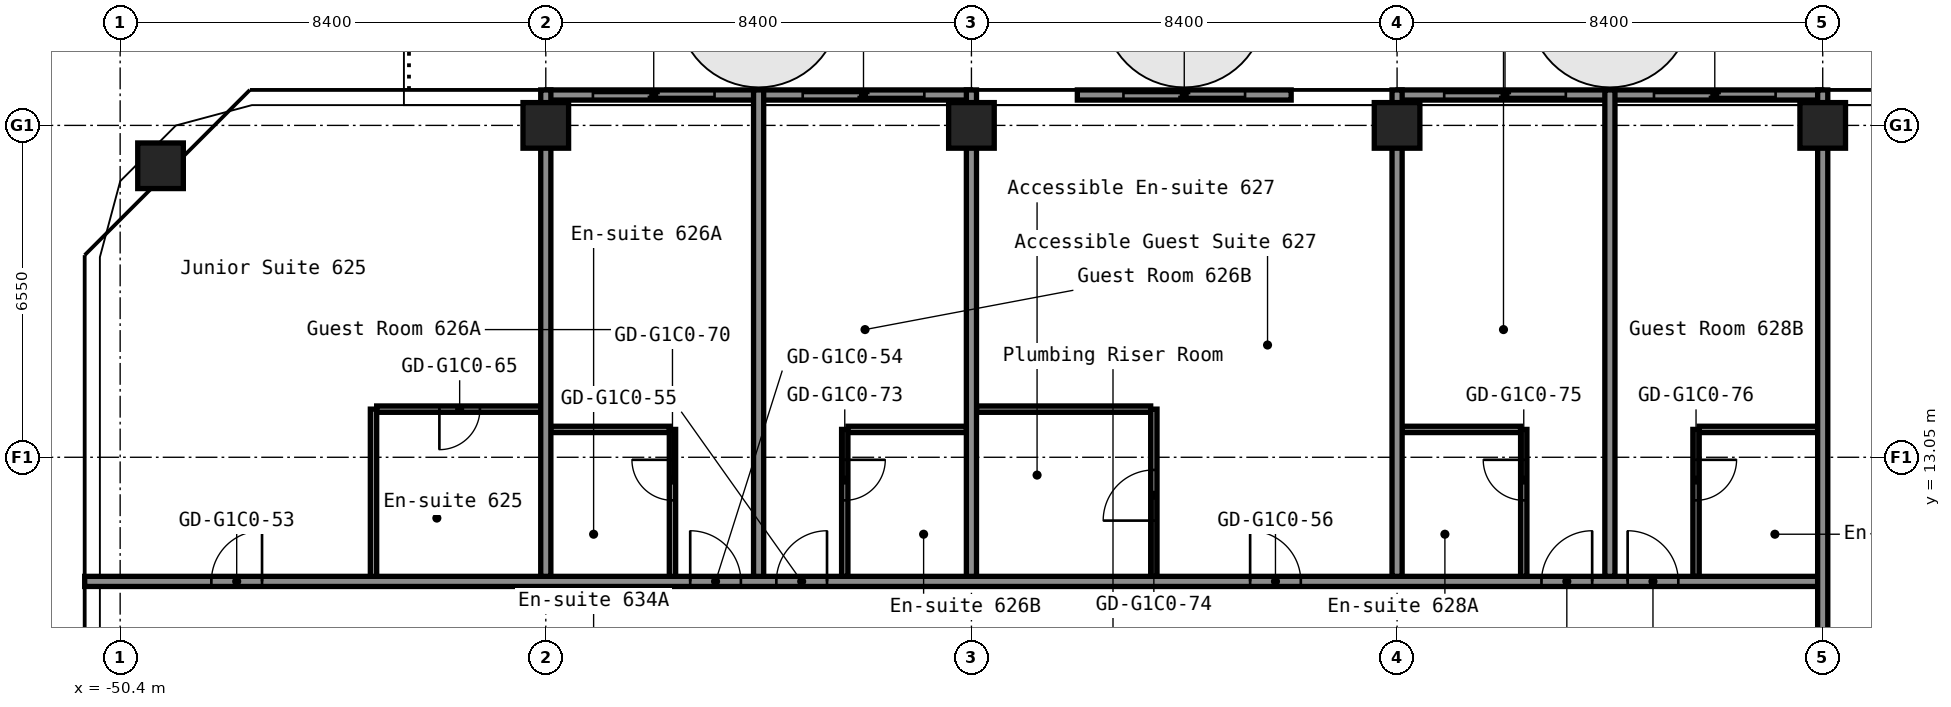
"""IFC4 building model, lengths in metres.
Left out: names, types, materials, properties, quantities, classifications, styles, units other than length and angle.
Written with IfcOpenShell. Run it as: python <this file> out.ifc"""

import sys

from ifc_helpers import new_model, si_unit, direction, frame, frame_2d, origin, origin_2d, place, context, subcontext, project, spatial, rectangle, hollow_rectangle, extrude, element, fill, save


model = new_model("IFC4")
c1 = context("Model", 3, precision=1e-05, world=origin(), true_north=direction((0.0, 1.0)))
c2 = subcontext(c1, "Body", "Model", "MODEL_VIEW")
j1 = project(units=[si_unit("LENGTHUNIT", "METRE"), si_unit("PLANEANGLEUNIT", "RADIAN")], contexts=[c1])
p1 = place(None, origin())
s1 = spatial("IfcSite", under=j1, at=p1, CompositionType="ELEMENT")
p2 = place(p1, origin())
s2 = spatial("IfcBuilding", under=s1, at=p2, CompositionType="ELEMENT")
p3 = place(p2, frame((0.0, 0.0, 26.2)))
s3 = spatial("IfcBuildingStorey", under=s2, at=p3, CompositionType="ELEMENT", Elevation=26.2)
for number, where, z_axis, x_axis in (
    (1, (-49.603, 18.803, 0.0), (0.0, 0.0, 1.0), (1.0, 0.0, 0.0)),
    (2, (-42.0, 19.6, 0.0), (0.0, 0.0, 1.0), (1.0, 0.0, 0.0)),
    (3, (-33.6, 19.6, 0.0), (0.0, 0.0, 1.0), (1.0, 0.0, 0.0)),
    (4, (-25.2, 19.6, 0.0), (0.0, 0.0, 1.0), (1.0, 0.0, 0.0)),
    (5, (-16.8, 19.6, 0.0), (0.0, 0.0, 1.0), (1.0, 0.0, 0.0)),
):
    element("IfcColumn", number, at=place(p3, frame(where, z_axis=z_axis, x_axis=x_axis)), inside=s3, PredefinedType="COLUMN", context=c2, shape_type="SweptSolid", body=[
        extrude(hollow_rectangle(XDim=0.9, YDim=0.9, WallThickness=0.036, at=origin_2d()), origin(), (0.0, 0.0, 1.0), 2.8),
    ])
p4 = place(p3, frame((-51.1, 10.6, 0.0), z_axis=(0.0, 0.0, 1.0), x_axis=(1.0, 0.0, 0.0)))
e6 = element("IfcWall", 6, at=p4, inside=s3, PredefinedType="PARTITIONING", context=c2, shape_type="SweptSolid", body=[
    extrude(rectangle(XDim=34.3, YDim=0.2, at=frame_2d((17.15, 0.0))), origin(), (0.0, 0.0, 1.0), 2.8),
])
p5 = place(p4, frame((2.5, 0.0, 0.0)))
e7 = element("IfcOpeningElement", 7, at=p5, cuts=e6, PredefinedType="OPENING", context=c2, shape_type="SweptSolid", body=[
    extrude(rectangle(XDim=1.0, YDim=2.1, at=frame_2d((0.5, 1.05))), frame((0.0, 0.11, 0.0), z_axis=(0.0, -1.0, 0.0), x_axis=(1.0, 0.0, 0.0)), (0.0, 0.0, 1.0), 0.22),
])
p6 = place(p4, frame((11.95, 0.0, 0.0)))
e8 = element("IfcOpeningElement", 8, at=p6, cuts=e6, PredefinedType="OPENING", context=c2, shape_type="SweptSolid", body=[
    extrude(rectangle(XDim=1.0, YDim=2.1, at=frame_2d((0.5, 1.05))), frame((0.0, 0.11, 0.0), z_axis=(0.0, -1.0, 0.0), x_axis=(1.0, 0.0, 0.0)), (0.0, 0.0, 1.0), 0.22),
])
p7 = place(p4, frame((13.65, 0.0, 0.0)))
e9 = element("IfcOpeningElement", 9, at=p7, cuts=e6, PredefinedType="OPENING", context=c2, shape_type="SweptSolid", body=[
    extrude(rectangle(XDim=1.0, YDim=2.1, at=frame_2d((0.5, 1.05))), frame((0.0, 0.11, 0.0), z_axis=(0.0, -1.0, 0.0), x_axis=(1.0, 0.0, 0.0)), (0.0, 0.0, 1.0), 0.22),
])
p8 = place(p4, frame((23.0, 0.0, 0.0)))
e10 = element("IfcOpeningElement", 10, at=p8, cuts=e6, PredefinedType="OPENING", context=c2, shape_type="SweptSolid", body=[
    extrude(rectangle(XDim=1.0, YDim=2.1, at=frame_2d((0.5, 1.05))), frame((0.0, 0.11, 0.0), z_axis=(0.0, -1.0, 0.0), x_axis=(1.0, 0.0, 0.0)), (0.0, 0.0, 1.0), 0.22),
])
p9 = place(p4, frame((28.75, 0.0, 0.0)))
e11 = element("IfcOpeningElement", 11, at=p9, cuts=e6, PredefinedType="OPENING", context=c2, shape_type="SweptSolid", body=[
    extrude(rectangle(XDim=1.0, YDim=2.1, at=frame_2d((0.5, 1.05))), frame((0.0, 0.11, 0.0), z_axis=(0.0, -1.0, 0.0), x_axis=(1.0, 0.0, 0.0)), (0.0, 0.0, 1.0), 0.22),
])
p10 = place(p4, frame((30.45, 0.0, 0.0)))
e12 = element("IfcOpeningElement", 12, at=p10, cuts=e6, PredefinedType="OPENING", context=c2, shape_type="SweptSolid", body=[
    extrude(rectangle(XDim=1.0, YDim=2.1, at=frame_2d((0.5, 1.05))), frame((0.0, 0.11, 0.0), z_axis=(0.0, -1.0, 0.0), x_axis=(1.0, 0.0, 0.0)), (0.0, 0.0, 1.0), 0.22),
])
p11 = place(p3, frame((-41.9, 13.6, 0.0), z_axis=(0.0, 0.0, 1.0), x_axis=(1.0, 0.0, 0.0)))
e13 = element("IfcWall", 13, at=p11, inside=s3, PredefinedType="PARTITIONING", context=c2, shape_type="SweptSolid", body=[
    extrude(rectangle(XDim=2.337, YDim=0.125, at=frame_2d((1.169, 0.0))), origin(), (0.0, 0.0, 1.0), 2.8),
])
for number, where, z_axis, x_axis in (
    (14, (-36.038, 13.6, 0.0), (0.0, 0.0, 1.0), (1.0, 0.0, 0.0)),
    (15, (-25.1, 13.6, 0.0), (0.0, 0.0, 1.0), (1.0, 0.0, 0.0)),
    (16, (-19.238, 13.6, 0.0), (0.0, 0.0, 1.0), (1.0, 0.0, 0.0)),
):
    element("IfcWall", number, at=place(p3, frame(where, z_axis=z_axis, x_axis=x_axis)), inside=s3, PredefinedType="PARTITIONING", context=c2, shape_type="SweptSolid", body=[
        extrude(rectangle(XDim=2.338, YDim=0.125, at=frame_2d((1.169, 0.0))), origin(), (0.0, 0.0, 1.0), 2.8),
    ])
p12 = place(p3, frame((-45.337, 14.0, 0.0), z_axis=(0.0, 0.0, 1.0), x_axis=(1.0, 0.0, 0.0)))
e17 = element("IfcWall", 17, at=p12, inside=s3, PredefinedType="PARTITIONING", context=c2, shape_type="SweptSolid", body=[
    extrude(rectangle(XDim=3.237, YDim=0.125, at=frame_2d((1.619, 0.0))), origin(), (0.0, 0.0, 1.0), 2.8),
])
p13 = place(p12, frame((1.238, 0.0, 0.0)))
e18 = element("IfcOpeningElement", 18, at=p13, cuts=e17, PredefinedType="OPENING", context=c2, shape_type="SweptSolid", body=[
    extrude(rectangle(XDim=0.8, YDim=2.1, at=frame_2d((0.4, 1.05))), frame((0.0, 0.073, 0.0), z_axis=(0.0, -1.0, 0.0), x_axis=(1.0, 0.0, 0.0)), (0.0, 0.0, 1.0), 0.145),
])
p14 = place(p3, frame((-33.5, 14.0, 0.0), z_axis=(0.0, 0.0, 1.0), x_axis=(1.0, 0.0, 0.0)))
e19 = element("IfcWall", 19, at=p14, inside=s3, PredefinedType="PARTITIONING", context=c2, shape_type="SweptSolid", body=[
    extrude(rectangle(XDim=3.438, YDim=0.125, at=frame_2d((1.719, 0.0))), origin(), (0.0, 0.0, 1.0), 2.8),
])
p15 = place(p3, frame((-45.4, 10.7, 0.0), z_axis=(0.0, 0.0, 1.0), x_axis=(0.0, 1.0, 0.0)))
e20 = element("IfcWall", 20, at=p15, inside=s3, PredefinedType="PARTITIONING", context=c2, shape_type="SweptSolid", body=[
    extrude(rectangle(XDim=3.3, YDim=0.125, at=frame_2d((1.65, 0.0))), origin(), (0.0, 0.0, 1.0), 2.8),
])
p16 = place(p3, frame((-42.0, 10.7, 0.0), z_axis=(0.0, 0.0, 1.0), x_axis=(0.0, 1.0, 0.0)))
e21 = element("IfcWall", 21, at=p16, inside=s3, PredefinedType="PARTITIONING", context=c2, shape_type="SweptSolid", body=[
    extrude(rectangle(XDim=9.6, YDim=0.2, at=frame_2d((4.8, 0.0))), origin(), (0.0, 0.0, 1.0), 2.8),
])
p17 = place(p3, frame((-39.5, 10.7, 0.0), z_axis=(0.0, 0.0, 1.0), x_axis=(0.0, 1.0, 0.0)))
e22 = element("IfcWall", 22, at=p17, inside=s3, PredefinedType="PARTITIONING", context=c2, shape_type="SweptSolid", body=[
    extrude(rectangle(XDim=2.9, YDim=0.125, at=frame_2d((1.45, 0.0))), origin(), (0.0, 0.0, 1.0), 2.8),
])
p18 = place(p17, frame((1.5, 0.0, 0.0)))
e23 = element("IfcOpeningElement", 23, at=p18, cuts=e22, PredefinedType="OPENING", context=c2, shape_type="SweptSolid", body=[
    extrude(rectangle(XDim=0.8, YDim=2.1, at=frame_2d((0.4, 1.05))), frame((0.0, 0.073, 0.0), z_axis=(0.0, -1.0, 0.0), x_axis=(1.0, 0.0, 0.0)), (0.0, 0.0, 1.0), 0.145),
])
p19 = place(p3, frame((-37.8, 10.7, 0.0), z_axis=(0.0, 0.0, 1.0), x_axis=(0.0, 1.0, 0.0)))
e24 = element("IfcWall", 24, at=p19, inside=s3, PredefinedType="PARTITIONING", context=c2, shape_type="SweptSolid", body=[
    extrude(rectangle(XDim=9.6, YDim=0.2, at=frame_2d((4.8, 0.0))), origin(), (0.0, 0.0, 1.0), 2.8),
])
p20 = place(p3, frame((-36.1, 10.7, 0.0), z_axis=(0.0, 0.0, 1.0), x_axis=(0.0, 1.0, 0.0)))
e25 = element("IfcWall", 25, at=p20, inside=s3, PredefinedType="PARTITIONING", context=c2, shape_type="SweptSolid", body=[
    extrude(rectangle(XDim=2.9, YDim=0.125, at=frame_2d((1.45, 0.0))), origin(), (0.0, 0.0, 1.0), 2.8),
])
p21 = place(p20, frame((1.5, 0.0, 0.0)))
e26 = element("IfcOpeningElement", 26, at=p21, cuts=e25, PredefinedType="OPENING", context=c2, shape_type="SweptSolid", body=[
    extrude(rectangle(XDim=0.8, YDim=2.1, at=frame_2d((0.4, 1.05))), frame((0.0, 0.073, 0.0), z_axis=(0.0, -1.0, 0.0), x_axis=(1.0, 0.0, 0.0)), (0.0, 0.0, 1.0), 0.145),
])
p22 = place(p3, frame((-33.6, 10.7, 0.0), z_axis=(0.0, 0.0, 1.0), x_axis=(0.0, 1.0, 0.0)))
e27 = element("IfcWall", 27, at=p22, inside=s3, PredefinedType="PARTITIONING", context=c2, shape_type="SweptSolid", body=[
    extrude(rectangle(XDim=9.6, YDim=0.2, at=frame_2d((4.8, 0.0))), origin(), (0.0, 0.0, 1.0), 2.8),
])
p23 = place(p3, frame((-30.0, 10.7, 0.0), z_axis=(0.0, 0.0, 1.0), x_axis=(0.0, 1.0, 0.0)))
e28 = element("IfcWall", 28, at=p23, inside=s3, PredefinedType="PARTITIONING", context=c2, shape_type="SweptSolid", body=[
    extrude(rectangle(XDim=3.3, YDim=0.125, at=frame_2d((1.65, 0.0))), origin(), (0.0, 0.0, 1.0), 2.8),
])
p24 = place(p23, frame((1.1, 0.0, 0.0)))
e29 = element("IfcOpeningElement", 29, at=p24, cuts=e28, PredefinedType="OPENING", context=c2, shape_type="SweptSolid", body=[
    extrude(rectangle(XDim=1.0, YDim=2.1, at=frame_2d((0.5, 1.05))), frame((0.0, 0.073, 0.0), z_axis=(0.0, -1.0, 0.0), x_axis=(1.0, 0.0, 0.0)), (0.0, 0.0, 1.0), 0.145),
])
p25 = place(p3, frame((-25.2, 10.7, 0.0), z_axis=(0.0, 0.0, 1.0), x_axis=(0.0, 1.0, 0.0)))
e30 = element("IfcWall", 30, at=p25, inside=s3, PredefinedType="PARTITIONING", context=c2, shape_type="SweptSolid", body=[
    extrude(rectangle(XDim=9.6, YDim=0.2, at=frame_2d((4.8, 0.0))), origin(), (0.0, 0.0, 1.0), 2.8),
])
p26 = place(p3, frame((-22.7, 10.7, 0.0), z_axis=(0.0, 0.0, 1.0), x_axis=(0.0, 1.0, 0.0)))
e31 = element("IfcWall", 31, at=p26, inside=s3, PredefinedType="PARTITIONING", context=c2, shape_type="SweptSolid", body=[
    extrude(rectangle(XDim=2.9, YDim=0.125, at=frame_2d((1.45, 0.0))), origin(), (0.0, 0.0, 1.0), 2.8),
])
p27 = place(p26, frame((1.5, 0.0, 0.0)))
e32 = element("IfcOpeningElement", 32, at=p27, cuts=e31, PredefinedType="OPENING", context=c2, shape_type="SweptSolid", body=[
    extrude(rectangle(XDim=0.8, YDim=2.1, at=frame_2d((0.4, 1.05))), frame((0.0, 0.073, 0.0), z_axis=(0.0, -1.0, 0.0), x_axis=(1.0, 0.0, 0.0)), (0.0, 0.0, 1.0), 0.145),
])
p28 = place(p3, frame((-21.0, 10.7, 0.0), z_axis=(0.0, 0.0, 1.0), x_axis=(0.0, 1.0, 0.0)))
e33 = element("IfcWall", 33, at=p28, inside=s3, PredefinedType="PARTITIONING", context=c2, shape_type="SweptSolid", body=[
    extrude(rectangle(XDim=9.6, YDim=0.2, at=frame_2d((4.8, 0.0))), origin(), (0.0, 0.0, 1.0), 2.8),
])
p29 = place(p3, frame((-19.3, 10.7, 0.0), z_axis=(0.0, 0.0, 1.0), x_axis=(0.0, 1.0, 0.0)))
e34 = element("IfcWall", 34, at=p29, inside=s3, PredefinedType="PARTITIONING", context=c2, shape_type="SweptSolid", body=[
    extrude(rectangle(XDim=2.9, YDim=0.125, at=frame_2d((1.45, 0.0))), origin(), (0.0, 0.0, 1.0), 2.8),
])
p30 = place(p29, frame((1.5, 0.0, 0.0)))
e35 = element("IfcOpeningElement", 35, at=p30, cuts=e34, PredefinedType="OPENING", context=c2, shape_type="SweptSolid", body=[
    extrude(rectangle(XDim=0.8, YDim=2.1, at=frame_2d((0.4, 1.05))), frame((0.0, 0.073, 0.0), z_axis=(0.0, -1.0, 0.0), x_axis=(1.0, 0.0, 0.0)), (0.0, 0.0, 1.0), 0.145),
])
p31 = place(p3, frame((-16.8, 8.39, 0.0), z_axis=(0.0, 0.0, 1.0), x_axis=(0.0, 1.0, 0.0)))
e36 = element("IfcWall", 36, at=p31, inside=s3, PredefinedType="PARTITIONING", context=c2, shape_type="SweptSolid", body=[
    extrude(rectangle(XDim=11.91, YDim=0.2, at=frame_2d((5.955, 0.0))), origin(), (0.0, 0.0, 1.0), 2.8),
])
p32 = place(p3, frame((-16.82, 20.2, 0.0), z_axis=(0.0, 0.0, 1.0), x_axis=(-1.0, 0.0, 0.0)))
p33 = place(p32, frame((0.91, 0.0, 0.0)))
p34 = place(p33, frame((2.4, 0.0, 0.0), z_axis=(0.0, 0.0, 1.0), x_axis=(-1.0, 0.0, 0.0)))
e37 = element("IfcDoor", 37, at=p34, inside=s3, OperationType="SLIDING_TO_LEFT", PredefinedType="DOOR", context=c2, shape_type="SweptSolid", body=[
    extrude(rectangle(XDim=2.4, YDim=2.2, at=frame_2d((1.2, 1.1))), frame((0.0, 0.025, 0.0), z_axis=(0.0, -1.0, 0.0), x_axis=(1.0, 0.0, 0.0)), (0.0, 0.0, 1.0), 0.05),
])
p35 = place(p3, frame((-20.96, 20.2, 0.0), z_axis=(0.0, 0.0, 1.0), x_axis=(-1.0, 0.0, 0.0)))
p36 = place(p35, frame((0.91, 0.0, 0.0)))
p37 = place(p36, frame((2.4, 0.0, 0.0), z_axis=(0.0, 0.0, 1.0), x_axis=(-1.0, 0.0, 0.0)))
e38 = element("IfcDoor", 38, at=p37, inside=s3, OperationType="SLIDING_TO_LEFT", PredefinedType="DOOR", context=c2, shape_type="SweptSolid", body=[
    extrude(rectangle(XDim=2.4, YDim=2.2, at=frame_2d((1.2, 1.1))), frame((0.0, 0.025, 0.0), z_axis=(0.0, -1.0, 0.0), x_axis=(1.0, 0.0, 0.0)), (0.0, 0.0, 1.0), 0.05),
])
p38 = place(p3, frame((-27.29, 20.2, 0.0), z_axis=(0.0, 0.0, 1.0), x_axis=(-1.0, 0.0, 0.0)))
p39 = place(p38, frame((0.91, 0.0, 0.0)))
p40 = place(p39, frame((2.4, 0.0, 0.0), z_axis=(0.0, 0.0, 1.0), x_axis=(-1.0, 0.0, 0.0)))
e39 = element("IfcDoor", 39, at=p40, inside=s3, OperationType="SLIDING_TO_LEFT", PredefinedType="DOOR", context=c2, shape_type="SweptSolid", body=[
    extrude(rectangle(XDim=2.4, YDim=2.2, at=frame_2d((1.2, 1.1))), frame((0.0, 0.025, 0.0), z_axis=(0.0, -1.0, 0.0), x_axis=(1.0, 0.0, 0.0)), (0.0, 0.0, 1.0), 0.05),
])
p41 = place(p3, frame((-33.62, 20.2, 0.0), z_axis=(0.0, 0.0, 1.0), x_axis=(-1.0, 0.0, 0.0)))
p42 = place(p41, frame((0.91, 0.0, 0.0)))
p43 = place(p42, frame((2.4, 0.0, 0.0), z_axis=(0.0, 0.0, 1.0), x_axis=(-1.0, 0.0, 0.0)))
e40 = element("IfcDoor", 40, at=p43, inside=s3, OperationType="SLIDING_TO_LEFT", PredefinedType="DOOR", context=c2, shape_type="SweptSolid", body=[
    extrude(rectangle(XDim=2.4, YDim=2.2, at=frame_2d((1.2, 1.1))), frame((0.0, 0.025, 0.0), z_axis=(0.0, -1.0, 0.0), x_axis=(1.0, 0.0, 0.0)), (0.0, 0.0, 1.0), 0.05),
])
p44 = place(p3, frame((-37.76, 20.2, 0.0), z_axis=(0.0, 0.0, 1.0), x_axis=(-1.0, 0.0, 0.0)))
p45 = place(p44, frame((0.91, 0.0, 0.0)))
p46 = place(p45, frame((2.4, 0.0, 0.0), z_axis=(0.0, 0.0, 1.0), x_axis=(-1.0, 0.0, 0.0)))
e41 = element("IfcDoor", 41, at=p46, inside=s3, OperationType="SLIDING_TO_LEFT", PredefinedType="DOOR", context=c2, shape_type="SweptSolid", body=[
    extrude(rectangle(XDim=2.4, YDim=2.2, at=frame_2d((1.2, 1.1))), frame((0.0, 0.025, 0.0), z_axis=(0.0, -1.0, 0.0), x_axis=(1.0, 0.0, 0.0)), (0.0, 0.0, 1.0), 0.05),
])
p47 = place(p5, origin())
e42 = element("IfcDoor", 42, at=p47, inside=s3, OperationType="SINGLE_SWING_LEFT", PredefinedType="DOOR", context=c2, shape_type="SweptSolid", body=[
    extrude(rectangle(XDim=1.0, YDim=2.1, at=frame_2d((0.5, 1.05))), frame((0.0, 0.025, 0.0), z_axis=(0.0, -1.0, 0.0), x_axis=(1.0, 0.0, 0.0)), (0.0, 0.0, 1.0), 0.05),
])
fill(e7, e42)
p48 = place(p6, origin())
e43 = element("IfcDoor", 43, at=p48, inside=s3, OperationType="SINGLE_SWING_RIGHT", PredefinedType="DOOR", context=c2, shape_type="SweptSolid", body=[
    extrude(rectangle(XDim=1.0, YDim=2.1, at=frame_2d((0.5, 1.05))), frame((0.0, 0.025, 0.0), z_axis=(0.0, -1.0, 0.0), x_axis=(1.0, 0.0, 0.0)), (0.0, 0.0, 1.0), 0.05),
])
fill(e8, e43)
p49 = place(p7, origin())
e44 = element("IfcDoor", 44, at=p49, inside=s3, OperationType="SINGLE_SWING_LEFT", PredefinedType="DOOR", context=c2, shape_type="SweptSolid", body=[
    extrude(rectangle(XDim=1.0, YDim=2.1, at=frame_2d((0.5, 1.05))), frame((0.0, 0.025, 0.0), z_axis=(0.0, -1.0, 0.0), x_axis=(1.0, 0.0, 0.0)), (0.0, 0.0, 1.0), 0.05),
])
fill(e9, e44)
p50 = place(p8, origin())
e45 = element("IfcDoor", 45, at=p50, inside=s3, OperationType="SINGLE_SWING_RIGHT", PredefinedType="DOOR", context=c2, shape_type="SweptSolid", body=[
    extrude(rectangle(XDim=1.0, YDim=2.1, at=frame_2d((0.5, 1.05))), frame((0.0, 0.025, 0.0), z_axis=(0.0, -1.0, 0.0), x_axis=(1.0, 0.0, 0.0)), (0.0, 0.0, 1.0), 0.05),
])
fill(e10, e45)
p51 = place(p9, origin())
e46 = element("IfcDoor", 46, at=p51, inside=s3, OperationType="SINGLE_SWING_LEFT", PredefinedType="DOOR", context=c2, shape_type="SweptSolid", body=[
    extrude(rectangle(XDim=1.0, YDim=2.1, at=frame_2d((0.5, 1.05))), frame((0.0, 0.025, 0.0), z_axis=(0.0, -1.0, 0.0), x_axis=(1.0, 0.0, 0.0)), (0.0, 0.0, 1.0), 0.05),
])
fill(e11, e46)
p52 = place(p10, origin())
e47 = element("IfcDoor", 47, at=p52, inside=s3, OperationType="SINGLE_SWING_RIGHT", PredefinedType="DOOR", context=c2, shape_type="SweptSolid", body=[
    extrude(rectangle(XDim=1.0, YDim=2.1, at=frame_2d((0.5, 1.05))), frame((0.0, 0.025, 0.0), z_axis=(0.0, -1.0, 0.0), x_axis=(1.0, 0.0, 0.0)), (0.0, 0.0, 1.0), 0.05),
])
fill(e12, e47)
p53 = place(p13, origin())
e48 = element("IfcDoor", 48, at=p53, inside=s3, OperationType="SINGLE_SWING_LEFT", PredefinedType="DOOR", context=c2, shape_type="SweptSolid", body=[
    extrude(rectangle(XDim=0.8, YDim=2.1, at=frame_2d((0.4, 1.05))), frame((0.0, 0.025, 0.0), z_axis=(0.0, -1.0, 0.0), x_axis=(1.0, 0.0, 0.0)), (0.0, 0.0, 1.0), 0.05),
])
fill(e18, e48)
p54 = place(p18, origin())
e49 = element("IfcDoor", 49, at=p54, inside=s3, OperationType="SINGLE_SWING_LEFT", PredefinedType="DOOR", context=c2, shape_type="SweptSolid", body=[
    extrude(rectangle(XDim=0.8, YDim=2.1, at=frame_2d((0.4, 1.05))), frame((0.0, 0.025, 0.0), z_axis=(0.0, -1.0, 0.0), x_axis=(1.0, 0.0, 0.0)), (0.0, 0.0, 1.0), 0.05),
])
fill(e23, e49)
p55 = place(p21, origin())
e50 = element("IfcDoor", 50, at=p55, inside=s3, OperationType="SINGLE_SWING_RIGHT", PredefinedType="DOOR", context=c2, shape_type="SweptSolid", body=[
    extrude(rectangle(XDim=0.8, YDim=2.1, at=frame_2d((0.4, 1.05))), frame((0.0, 0.025, 0.0), z_axis=(0.0, -1.0, 0.0), x_axis=(1.0, 0.0, 0.0)), (0.0, 0.0, 1.0), 0.05),
])
fill(e26, e50)
p56 = place(p24, origin())
e51 = element("IfcDoor", 51, at=p56, inside=s3, OperationType="SINGLE_SWING_RIGHT", PredefinedType="DOOR", context=c2, shape_type="SweptSolid", body=[
    extrude(rectangle(XDim=1.0, YDim=2.1, at=frame_2d((0.5, 1.05))), frame((0.0, 0.025, 0.0), z_axis=(0.0, -1.0, 0.0), x_axis=(1.0, 0.0, 0.0)), (0.0, 0.0, 1.0), 0.05),
])
fill(e29, e51)
p57 = place(p27, origin())
e52 = element("IfcDoor", 52, at=p57, inside=s3, OperationType="SINGLE_SWING_LEFT", PredefinedType="DOOR", context=c2, shape_type="SweptSolid", body=[
    extrude(rectangle(XDim=0.8, YDim=2.1, at=frame_2d((0.4, 1.05))), frame((0.0, 0.025, 0.0), z_axis=(0.0, -1.0, 0.0), x_axis=(1.0, 0.0, 0.0)), (0.0, 0.0, 1.0), 0.05),
])
fill(e32, e52)
p58 = place(p30, origin())
e53 = element("IfcDoor", 53, at=p58, inside=s3, OperationType="SINGLE_SWING_RIGHT", PredefinedType="DOOR", context=c2, shape_type="SweptSolid", body=[
    extrude(rectangle(XDim=0.8, YDim=2.1, at=frame_2d((0.4, 1.05))), frame((0.0, 0.025, 0.0), z_axis=(0.0, -1.0, 0.0), x_axis=(1.0, 0.0, 0.0)), (0.0, 0.0, 1.0), 0.05),
])
fill(e35, e53)
save(model, sys.argv[1])
